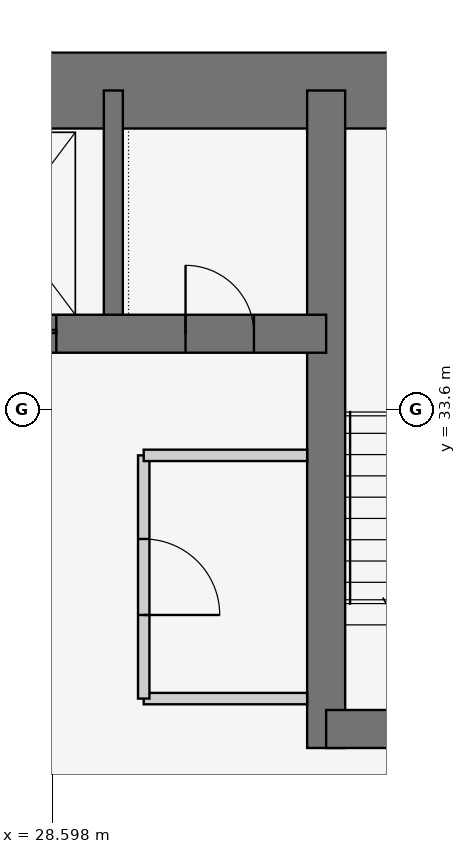
"""IFC4 building model, lengths in metres.
Left out: names, types, materials, properties, quantities, classifications, styles, units other than length and angle.
Written with IfcOpenShell. Run it as: python <this file> out.ifc"""

import sys

from ifc_helpers import new_model, si_unit, direction, frame, frame_2d, origin, place, context, subcontext, project, spatial, rectangle, extrude, element, fill, save


model = new_model("IFC4")
c1 = context("Model", 3, precision=1e-05, world=origin(), true_north=direction((0.0, 1.0)))
c2 = subcontext(c1, "Body", "Model", "MODEL_VIEW")
j1 = project(units=[si_unit("LENGTHUNIT", "METRE"), si_unit("PLANEANGLEUNIT", "RADIAN")], contexts=[c1])
p1 = place(None, origin())
s1 = spatial("IfcSite", under=j1, at=p1, CompositionType="ELEMENT")
p2 = place(p1, origin())
s2 = spatial("IfcBuilding", under=s1, at=p2, CompositionType="ELEMENT")
p3 = place(p2, frame((0.0, 0.0, 84.9)))
s3 = spatial("IfcBuildingStorey", under=s2, at=p3, CompositionType="ELEMENT", Elevation=84.9)
p4 = place(p3, frame((37.8, 37.8, 0.0), z_axis=(0.0, 0.0, 1.0), x_axis=(-1.0, 0.0, 0.0)))
e1 = element("IfcWall", 1, at=p4, inside=s3, PredefinedType="SHEAR", context=c2, shape_type="SweptSolid", body=[
    extrude(rectangle(XDim=17.3, YDim=1.0, at=frame_2d((8.65, 0.0))), origin(), (0.0, 0.0, 1.0), 3.6),
])
p5 = place(p3, frame((21.0, 34.6, 0.0), z_axis=(0.0, 0.0, 1.0), x_axis=(1.0, 0.0, 0.0)))
e2 = element("IfcWall", 2, at=p5, inside=s3, PredefinedType="SHEAR", context=c2, shape_type="SweptSolid", body=[
    extrude(rectangle(XDim=11.2, YDim=0.5, at=frame_2d((5.6, 0.0))), origin(), (0.0, 0.0, 1.0), 3.6),
])
p6 = place(p5, frame((9.35, 0.0, 0.0)))
e3 = element("IfcOpeningElement", 3, at=p6, cuts=e2, PredefinedType="OPENING", context=c2, shape_type="SweptSolid", body=[
    extrude(rectangle(XDim=0.9, YDim=2.1, at=frame_2d((0.45, 1.05))), frame((0.0, 0.26, 0.0), z_axis=(0.0, -1.0, 0.0), x_axis=(1.0, 0.0, 0.0)), (0.0, 0.0, 1.0), 0.52),
])
p7 = place(p5, frame((1.0, 0.0, 0.0)))
e4 = element("IfcOpeningElement", 4, at=p7, cuts=e2, PredefinedType="OPENING", context=c2, shape_type="SweptSolid", body=[
    extrude(rectangle(XDim=1.1, YDim=2.1, at=frame_2d((0.55, 1.05))), frame((0.0, 0.26, 0.0), z_axis=(0.0, -1.0, 0.0), x_axis=(1.0, 0.0, 0.0)), (0.0, 0.0, 1.0), 0.52),
])
p8 = place(p5, frame((3.65, 0.0, 0.0)))
e5 = element("IfcOpeningElement", 5, at=p8, cuts=e2, PredefinedType="OPENING", context=c2, shape_type="SweptSolid", body=[
    extrude(rectangle(XDim=1.1, YDim=2.1, at=frame_2d((0.55, 1.05))), frame((0.0, 0.26, 0.0), z_axis=(0.0, -1.0, 0.0), x_axis=(1.0, 0.0, 0.0)), (0.0, 0.0, 1.0), 0.52),
])
p9 = place(p5, frame((6.35, 0.0, 0.0)))
e6 = element("IfcOpeningElement", 6, at=p9, cuts=e2, PredefinedType="OPENING", context=c2, shape_type="SweptSolid", body=[
    extrude(rectangle(XDim=1.3, YDim=2.1, at=frame_2d((0.65, 1.05))), frame((0.0, 0.26, 0.0), z_axis=(0.0, -1.0, 0.0), x_axis=(1.0, 0.0, 0.0)), (0.0, 0.0, 1.0), 0.52),
])
p10 = place(p3, frame((32.2, 29.15, 0.0), z_axis=(0.0, 0.0, 1.0), x_axis=(0.0, 1.0, 0.0)))
e7 = element("IfcWall", 7, at=p10, inside=s3, PredefinedType="SHEAR", context=c2, shape_type="SweptSolid", body=[
    extrude(rectangle(XDim=8.65, YDim=0.5, at=frame_2d((4.325, 0.0))), origin(), (0.0, 0.0, 1.0), 3.6),
])
p11 = place(p3, frame((32.2, 29.4, 0.0), z_axis=(0.0, 0.0, 1.0), x_axis=(1.0, 0.0, 0.0)))
e8 = element("IfcWall", 8, at=p11, inside=s3, PredefinedType="SHEAR", context=c2, shape_type="SweptSolid", body=[
    extrude(rectangle(XDim=5.6, YDim=0.5, at=frame_2d((2.8, 0.0))), origin(), (0.0, 0.0, 1.0), 3.6),
])
p12 = place(p11, frame((2.0, 0.0, 0.0)))
e9 = element("IfcOpeningElement", 9, at=p12, cuts=e8, PredefinedType="OPENING", context=c2, shape_type="SweptSolid", body=[
    extrude(rectangle(XDim=1.2, YDim=2.1, at=frame_2d((0.6, 1.05))), frame((0.0, 0.26, 0.0), z_axis=(0.0, -1.0, 0.0), x_axis=(1.0, 0.0, 0.0)), (0.0, 0.0, 1.0), 0.52),
])
p13 = place(p3, frame((29.4, 34.6, 0.0), z_axis=(0.0, 0.0, 1.0), x_axis=(0.0, 1.0, 0.0)))
e10 = element("IfcWall", 10, at=p13, inside=s3, PredefinedType="SHEAR", context=c2, shape_type="SweptSolid", body=[
    extrude(rectangle(XDim=3.2, YDim=0.25, at=frame_2d((1.6, 0.0))), origin(), (0.0, 0.0, 1.0), 3.6),
])
p14 = place(p3, frame((31.95, 29.8, 0.0), z_axis=(0.0, 0.0, 1.0), x_axis=(-1.0, 0.0, 0.0)))
e11 = element("IfcWall", 11, at=p14, inside=s3, PredefinedType="PARTITIONING", context=c2, shape_type="SweptSolid", body=[
    extrude(rectangle(XDim=2.15, YDim=0.15, at=frame_2d((1.075, 0.0))), origin(), (0.0, 0.0, 1.0), 3.45),
])
p15 = place(p3, frame((29.8, 29.8, 0.0), z_axis=(0.0, 0.0, 1.0), x_axis=(0.0, 1.0, 0.0)))
e12 = element("IfcWall", 12, at=p15, inside=s3, PredefinedType="PARTITIONING", context=c2, shape_type="SweptSolid", body=[
    extrude(rectangle(XDim=3.2, YDim=0.15, at=frame_2d((1.6, 0.0))), origin(), (0.0, 0.0, 1.0), 3.45),
])
p16 = place(p15, frame((1.1, 0.0, 0.0)))
e13 = element("IfcOpeningElement", 13, at=p16, cuts=e12, PredefinedType="OPENING", context=c2, shape_type="SweptSolid", body=[
    extrude(rectangle(XDim=1.0, YDim=2.1, at=frame_2d((0.5, 1.05))), frame((0.0, 0.085, 0.0), z_axis=(0.0, -1.0, 0.0), x_axis=(1.0, 0.0, 0.0)), (0.0, 0.0, 1.0), 0.17),
])
p17 = place(p3, frame((29.8, 33.0, 0.0), z_axis=(0.0, 0.0, 1.0), x_axis=(1.0, 0.0, 0.0)))
e14 = element("IfcWall", 14, at=p17, inside=s3, PredefinedType="PARTITIONING", context=c2, shape_type="SweptSolid", body=[
    extrude(rectangle(XDim=2.15, YDim=0.15, at=frame_2d((1.075, 0.0))), origin(), (0.0, 0.0, 1.0), 3.45),
])
p18 = place(p6, origin())
e15 = element("IfcDoor", 15, at=p18, inside=s3, OperationType="SINGLE_SWING_LEFT", PredefinedType="DOOR", context=c2, shape_type="SweptSolid", body=[
    extrude(rectangle(XDim=0.9, YDim=2.1, at=frame_2d((0.45, 1.05))), frame((0.0, 0.025, 0.0), z_axis=(0.0, -1.0, 0.0), x_axis=(1.0, 0.0, 0.0)), (0.0, 0.0, 1.0), 0.05),
])
fill(e3, e15)
p19 = place(p16, frame((1.0, 0.0, 0.0), z_axis=(0.0, 0.0, 1.0), x_axis=(-1.0, 0.0, 0.0)))
e16 = element("IfcDoor", 16, at=p19, inside=s3, OperationType="SINGLE_SWING_RIGHT", PredefinedType="DOOR", context=c2, shape_type="SweptSolid", body=[
    extrude(rectangle(XDim=1.0, YDim=2.1, at=frame_2d((0.5, 1.05))), frame((0.0, 0.025, 0.0), z_axis=(0.0, -1.0, 0.0), x_axis=(1.0, 0.0, 0.0)), (0.0, 0.0, 1.0), 0.05),
])
fill(e13, e16)
p20 = place(p9, origin())
e17 = element("IfcDoor", 17, at=p20, inside=s3, OperationType="DOUBLE_DOOR_SLIDING", PredefinedType="DOOR", context=c2, shape_type="SweptSolid", body=[
    extrude(rectangle(XDim=1.3, YDim=2.1, at=frame_2d((0.65, 1.05))), frame((0.0, 0.025, 0.0), z_axis=(0.0, -1.0, 0.0), x_axis=(1.0, 0.0, 0.0)), (0.0, 0.0, 1.0), 0.05),
])
fill(e6, e17)
save(model, sys.argv[1])
